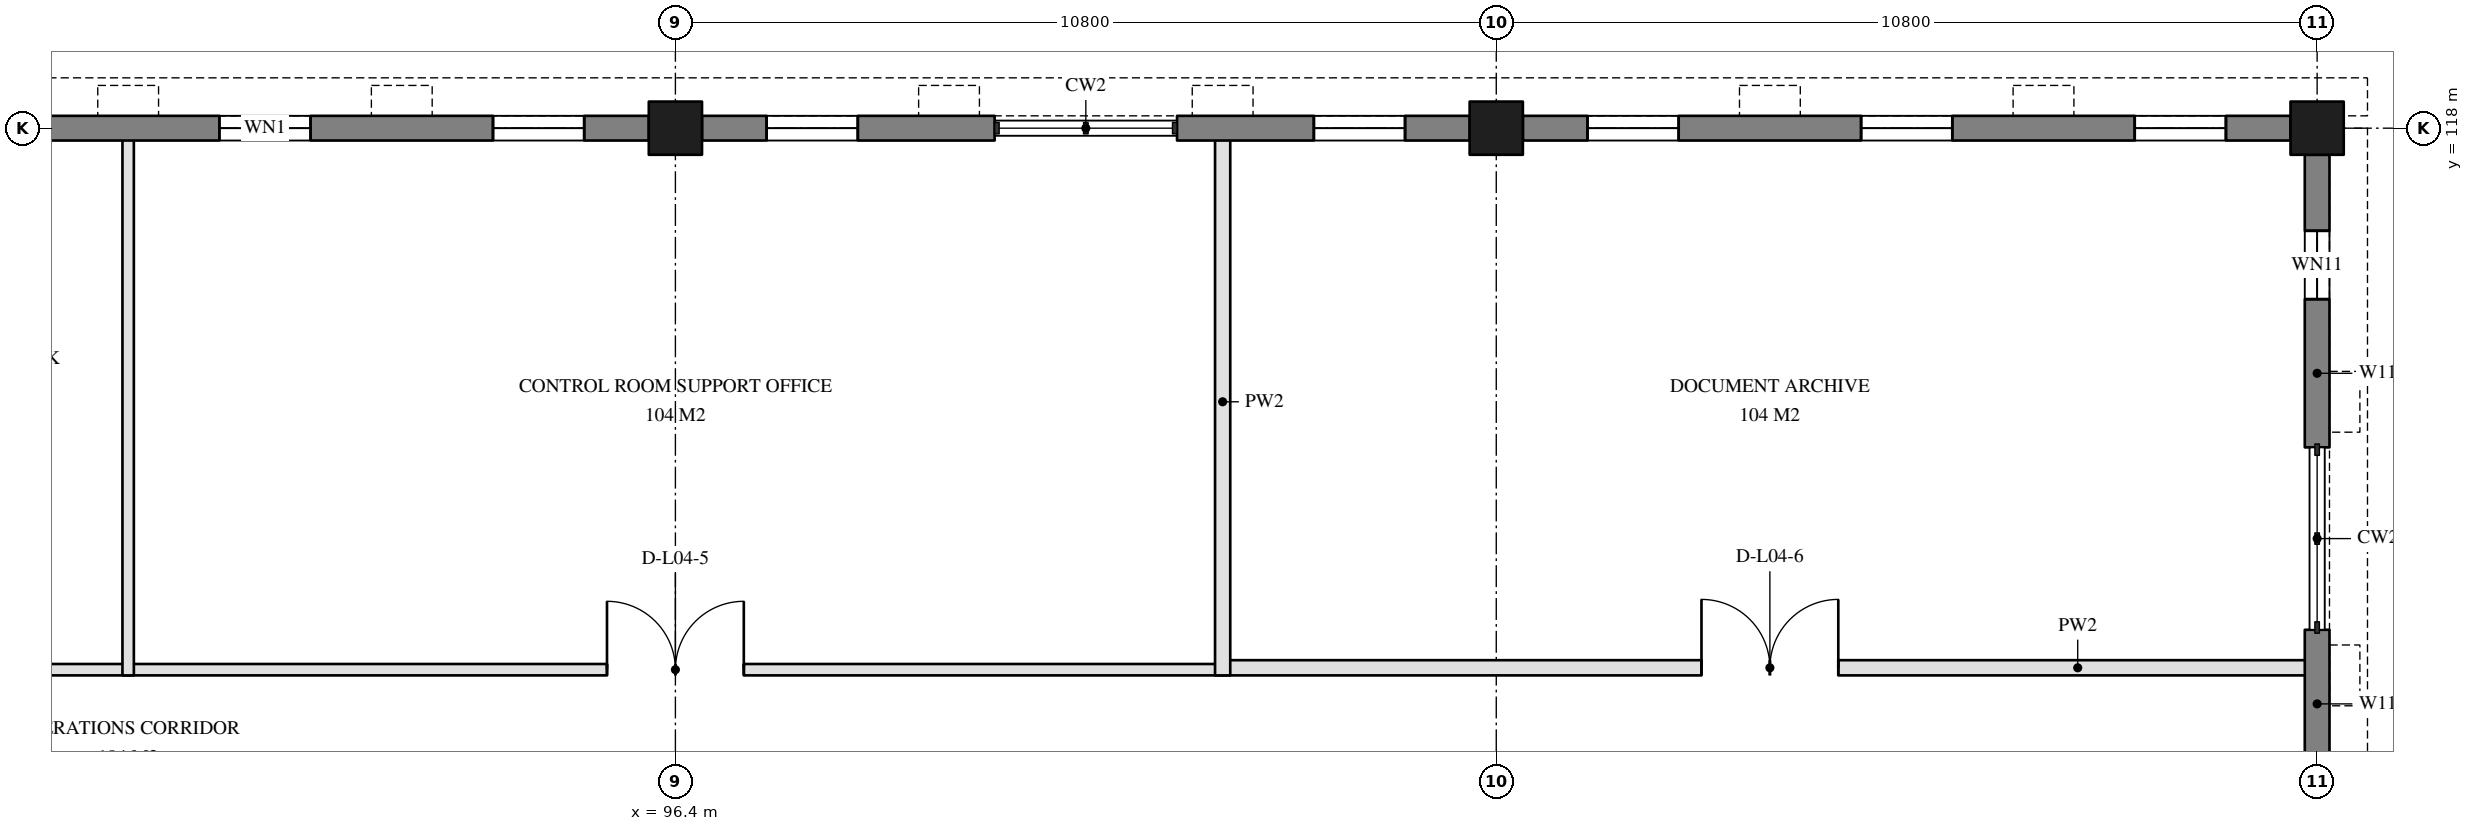
"""IFC4 building model, lengths in metres.
Left out: names, types, materials, properties, quantities, classifications, styles, units other than length and angle.
Written with IfcOpenShell. Run it as: python <this file> out.ifc"""

import sys

from ifc_helpers import new_model, si_unit, direction, frame, frame_2d, origin, origin_2d, place, context, subcontext, project, spatial, rectangle, extrude, element, fill, save


model = new_model("IFC4")
c1 = context("Model", 3, precision=1e-05, world=origin(), true_north=direction((0.0, 1.0)))
c2 = subcontext(c1, "Body", "Model", "MODEL_VIEW")
j1 = project(units=[si_unit("LENGTHUNIT", "METRE"), si_unit("PLANEANGLEUNIT", "RADIAN")], contexts=[c1])
p1 = place(None, origin())
s1 = spatial("IfcSite", under=j1, at=p1, CompositionType="ELEMENT")
p2 = place(p1, origin())
s2 = spatial("IfcBuilding", under=s1, at=p2, CompositionType="ELEMENT")
p3 = place(p2, frame((0.0, 0.0, 16.5)))
s3 = spatial("IfcBuildingStorey", under=s2, at=p3, CompositionType="ELEMENT", Elevation=16.5)
for number, where, z_axis, x_axis in (
    (1, (96.4, 118.0, 0.0), (0.0, 0.0, 1.0), (1.0, 0.0, 0.0)),
    (2, (107.2, 118.0, 0.0), (0.0, 0.0, 1.0), (1.0, 0.0, 0.0)),
    (3, (118.0, 118.0, 0.0), (0.0, 0.0, 1.0), (1.0, 0.0, 0.0)),
):
    element("IfcColumn", number, at=place(p3, frame(where, z_axis=z_axis, x_axis=x_axis)), inside=s3, PredefinedType="COLUMN", context=c2, shape_type="SweptSolid", body=[
        extrude(rectangle(XDim=0.7, YDim=0.7, at=origin_2d()), origin(), (0.0, 0.0, 1.0), 3.9),
    ])
p4 = place(p3, frame((85.95, 118.0, 0.0), z_axis=(0.0, 0.0, 1.0), x_axis=(1.0, 0.0, 0.0)))
e4 = element("IfcWall", 4, at=p4, inside=s3, PredefinedType="SOLIDWALL", context=c2, shape_type="SweptSolid", body=[
    extrude(rectangle(XDim=10.1, YDim=0.325, at=frame_2d((5.05, 0.0))), origin(), (0.0, 0.0, 1.0), 2.8),
])
p5 = place(p4, frame((0.85, 0.0, 0.75)))
e5 = element("IfcOpeningElement", 5, at=p5, cuts=e4, PredefinedType="OPENING", context=c2, shape_type="SweptSolid", body=[
    extrude(rectangle(XDim=1.2, YDim=1.95, at=frame_2d((0.6, 0.975))), frame((0.0, 0.172, 0.0), z_axis=(0.0, -1.0, 0.0), x_axis=(1.0, 0.0, 0.0)), (0.0, 0.0, 1.0), 0.345),
])
p6 = place(p4, frame((4.45, 0.0, 0.75)))
e6 = element("IfcOpeningElement", 6, at=p6, cuts=e4, PredefinedType="OPENING", context=c2, shape_type="SweptSolid", body=[
    extrude(rectangle(XDim=1.2, YDim=1.95, at=frame_2d((0.6, 0.975))), frame((0.0, 0.172, 0.0), z_axis=(0.0, -1.0, 0.0), x_axis=(1.0, 0.0, 0.0)), (0.0, 0.0, 1.0), 0.345),
])
p7 = place(p4, frame((8.05, 0.0, 0.75)))
e7 = element("IfcOpeningElement", 7, at=p7, cuts=e4, PredefinedType="OPENING", context=c2, shape_type="SweptSolid", body=[
    extrude(rectangle(XDim=1.2, YDim=1.95, at=frame_2d((0.6, 0.975))), frame((0.0, 0.172, 0.0), z_axis=(0.0, -1.0, 0.0), x_axis=(1.0, 0.0, 0.0)), (0.0, 0.0, 1.0), 0.345),
])
p8 = place(p3, frame((96.75, 118.0, 0.0), z_axis=(0.0, 0.0, 1.0), x_axis=(1.0, 0.0, 0.0)))
e8 = element("IfcWall", 8, at=p8, inside=s3, PredefinedType="SOLIDWALL", context=c2, shape_type="SweptSolid", body=[
    extrude(rectangle(XDim=3.85, YDim=0.325, at=frame_2d((1.925, 0.0))), origin(), (0.0, 0.0, 1.0), 2.8),
])
p9 = place(p8, frame((0.85, 0.0, 0.75)))
e9 = element("IfcOpeningElement", 9, at=p9, cuts=e8, PredefinedType="OPENING", context=c2, shape_type="SweptSolid", body=[
    extrude(rectangle(XDim=1.2, YDim=1.95, at=frame_2d((0.6, 0.975))), frame((0.0, 0.172, 0.0), z_axis=(0.0, -1.0, 0.0), x_axis=(1.0, 0.0, 0.0)), (0.0, 0.0, 1.0), 0.345),
])
p10 = place(p3, frame((103.0, 118.0, 0.0), z_axis=(0.0, 0.0, 1.0), x_axis=(1.0, 0.0, 0.0)))
e10 = element("IfcWall", 10, at=p10, inside=s3, PredefinedType="SOLIDWALL", context=c2, shape_type="SweptSolid", body=[
    extrude(rectangle(XDim=3.85, YDim=0.325, at=frame_2d((1.925, 0.0))), origin(), (0.0, 0.0, 1.0), 2.8),
])
p11 = place(p10, frame((1.8, 0.0, 0.75)))
e11 = element("IfcOpeningElement", 11, at=p11, cuts=e10, PredefinedType="OPENING", context=c2, shape_type="SweptSolid", body=[
    extrude(rectangle(XDim=1.2, YDim=1.95, at=frame_2d((0.6, 0.975))), frame((0.0, 0.172, 0.0), z_axis=(0.0, -1.0, 0.0), x_axis=(1.0, 0.0, 0.0)), (0.0, 0.0, 1.0), 0.345),
])
p12 = place(p3, frame((107.55, 118.0, 0.0), z_axis=(0.0, 0.0, 1.0), x_axis=(1.0, 0.0, 0.0)))
e12 = element("IfcWall", 12, at=p12, inside=s3, PredefinedType="SOLIDWALL", context=c2, shape_type="SweptSolid", body=[
    extrude(rectangle(XDim=10.1, YDim=0.325, at=frame_2d((5.05, 0.0))), origin(), (0.0, 0.0, 1.0), 2.8),
])
p13 = place(p12, frame((0.85, 0.0, 0.75)))
e13 = element("IfcOpeningElement", 13, at=p13, cuts=e12, PredefinedType="OPENING", context=c2, shape_type="SweptSolid", body=[
    extrude(rectangle(XDim=1.2, YDim=1.95, at=frame_2d((0.6, 0.975))), frame((0.0, 0.172, 0.0), z_axis=(0.0, -1.0, 0.0), x_axis=(1.0, 0.0, 0.0)), (0.0, 0.0, 1.0), 0.345),
])
p14 = place(p12, frame((4.45, 0.0, 0.75)))
e14 = element("IfcOpeningElement", 14, at=p14, cuts=e12, PredefinedType="OPENING", context=c2, shape_type="SweptSolid", body=[
    extrude(rectangle(XDim=1.2, YDim=1.95, at=frame_2d((0.6, 0.975))), frame((0.0, 0.172, 0.0), z_axis=(0.0, -1.0, 0.0), x_axis=(1.0, 0.0, 0.0)), (0.0, 0.0, 1.0), 0.345),
])
p15 = place(p12, frame((8.05, 0.0, 0.75)))
e15 = element("IfcOpeningElement", 15, at=p15, cuts=e12, PredefinedType="OPENING", context=c2, shape_type="SweptSolid", body=[
    extrude(rectangle(XDim=1.2, YDim=1.95, at=frame_2d((0.6, 0.975))), frame((0.0, 0.172, 0.0), z_axis=(0.0, -1.0, 0.0), x_axis=(1.0, 0.0, 0.0)), (0.0, 0.0, 1.0), 0.345),
])
p16 = place(p3, frame((118.0, 107.55, 0.0), z_axis=(0.0, 0.0, 1.0), x_axis=(0.0, 1.0, 0.0)))
e16 = element("IfcWall", 16, at=p16, inside=s3, PredefinedType="SOLIDWALL", context=c2, shape_type="SweptSolid", body=[
    extrude(rectangle(XDim=3.85, YDim=0.325, at=frame_2d((1.925, 0.0))), origin(), (0.0, 0.0, 1.0), 2.8),
])
p17 = place(p16, frame((1.0, 0.0, 0.9)))
e17 = element("IfcOpeningElement", 17, at=p17, cuts=e16, PredefinedType="OPENING", context=c2, shape_type="SweptSolid", body=[
    extrude(rectangle(XDim=0.9, YDim=1.8, at=frame_2d((0.45, 0.9))), frame((0.0, 0.172, 0.0), z_axis=(0.0, -1.0, 0.0), x_axis=(1.0, 0.0, 0.0)), (0.0, 0.0, 1.0), 0.345),
])
p18 = place(p3, frame((118.0, 113.8, 0.0), z_axis=(0.0, 0.0, 1.0), x_axis=(0.0, 1.0, 0.0)))
e18 = element("IfcWall", 18, at=p18, inside=s3, PredefinedType="SOLIDWALL", context=c2, shape_type="SweptSolid", body=[
    extrude(rectangle(XDim=3.85, YDim=0.325, at=frame_2d((1.925, 0.0))), origin(), (0.0, 0.0, 1.0), 2.8),
])
p19 = place(p18, frame((1.95, 0.0, 0.9)))
e19 = element("IfcOpeningElement", 19, at=p19, cuts=e18, PredefinedType="OPENING", context=c2, shape_type="SweptSolid", body=[
    extrude(rectangle(XDim=0.9, YDim=1.8, at=frame_2d((0.45, 0.9))), frame((0.0, 0.172, 0.0), z_axis=(0.0, -1.0, 0.0), x_axis=(1.0, 0.0, 0.0)), (0.0, 0.0, 1.0), 0.345),
])
p20 = place(p3, frame((64.0, 110.875, 0.0), z_axis=(0.0, 0.0, 1.0), x_axis=(1.0, 0.0, 0.0)))
e20 = element("IfcWall", 20, at=p20, inside=s3, PredefinedType="PARTITIONING", context=c2, shape_type="SweptSolid", body=[
    extrude(rectangle(XDim=25.2, YDim=0.15, at=frame_2d((12.6, 0.0))), origin(), (0.0, 0.0, 1.0), 2.8),
])
p21 = place(p20, frame((11.7, 0.0, 0.0)))
e21 = element("IfcOpeningElement", 21, at=p21, cuts=e20, PredefinedType="OPENING", context=c2, shape_type="SweptSolid", body=[
    extrude(rectangle(XDim=1.8, YDim=2.1, at=frame_2d((0.9, 1.05))), frame((0.0, 0.085, 0.0), z_axis=(0.0, -1.0, 0.0), x_axis=(1.0, 0.0, 0.0)), (0.0, 0.0, 1.0), 0.17),
])
p22 = place(p3, frame((89.2, 110.875, 0.0), z_axis=(0.0, 0.0, 1.0), x_axis=(1.0, 0.0, 0.0)))
e22 = element("IfcWall", 22, at=p22, inside=s3, PredefinedType="PARTITIONING", context=c2, shape_type="SweptSolid", body=[
    extrude(rectangle(XDim=14.4, YDim=0.15, at=frame_2d((7.2, 0.0))), origin(), (0.0, 0.0, 1.0), 2.8),
])
p23 = place(p22, frame((6.3, 0.0, 0.0)))
e23 = element("IfcOpeningElement", 23, at=p23, cuts=e22, PredefinedType="OPENING", context=c2, shape_type="SweptSolid", body=[
    extrude(rectangle(XDim=1.8, YDim=2.1, at=frame_2d((0.9, 1.05))), frame((0.0, 0.085, 0.0), z_axis=(0.0, -1.0, 0.0), x_axis=(1.0, 0.0, 0.0)), (0.0, 0.0, 1.0), 0.17),
])
p24 = place(p3, frame((103.6, 110.9, 0.0), z_axis=(0.0, 0.0, 1.0), x_axis=(1.0, 0.0, 0.0)))
e24 = element("IfcWall", 24, at=p24, inside=s3, PredefinedType="PARTITIONING", context=c2, shape_type="SweptSolid", body=[
    extrude(rectangle(XDim=14.4, YDim=0.2, at=frame_2d((7.2, 0.0))), origin(), (0.0, 0.0, 1.0), 2.8),
])
p25 = place(p24, frame((6.3, 0.0, 0.0)))
e25 = element("IfcOpeningElement", 25, at=p25, cuts=e24, PredefinedType="OPENING", context=c2, shape_type="SweptSolid", body=[
    extrude(rectangle(XDim=1.8, YDim=2.1, at=frame_2d((0.9, 1.05))), frame((0.0, 0.11, 0.0), z_axis=(0.0, -1.0, 0.0), x_axis=(1.0, 0.0, 0.0)), (0.0, 0.0, 1.0), 0.22),
])
p26 = place(p3, frame((89.2, 110.8, 0.0), z_axis=(0.0, 0.0, 1.0), x_axis=(0.0, 1.0, 0.0)))
e26 = element("IfcWall", 26, at=p26, inside=s3, PredefinedType="PARTITIONING", context=c2, shape_type="SweptSolid", body=[
    extrude(rectangle(XDim=7.2, YDim=0.15, at=frame_2d((3.6, 0.0))), origin(), (0.0, 0.0, 1.0), 2.8),
])
p27 = place(p3, frame((103.6, 110.8, 0.0), z_axis=(0.0, 0.0, 1.0), x_axis=(0.0, 1.0, 0.0)))
e27 = element("IfcWall", 27, at=p27, inside=s3, PredefinedType="PARTITIONING", context=c2, shape_type="SweptSolid", body=[
    extrude(rectangle(XDim=7.2, YDim=0.2, at=frame_2d((3.6, 0.0))), origin(), (0.0, 0.0, 1.0), 2.8),
])
p28 = place(p6, origin())
e28 = element("IfcWindow", 28, at=p28, inside=s3, PartitioningType="SINGLE_PANEL", PredefinedType="WINDOW", context=c2, shape_type="SweptSolid", body=[
    extrude(rectangle(XDim=1.2, YDim=1.95, at=frame_2d((0.6, 0.975))), frame((0.0, 0.03, 0.0), z_axis=(0.0, -1.0, 0.0), x_axis=(1.0, 0.0, 0.0)), (0.0, 0.0, 1.0), 0.06),
])
fill(e6, e28)
p29 = place(p7, origin())
e29 = element("IfcWindow", 29, at=p29, inside=s3, PartitioningType="SINGLE_PANEL", PredefinedType="WINDOW", context=c2, shape_type="SweptSolid", body=[
    extrude(rectangle(XDim=1.2, YDim=1.95, at=frame_2d((0.6, 0.975))), frame((0.0, 0.03, 0.0), z_axis=(0.0, -1.0, 0.0), x_axis=(1.0, 0.0, 0.0)), (0.0, 0.0, 1.0), 0.06),
])
fill(e7, e29)
p30 = place(p9, origin())
e30 = element("IfcWindow", 30, at=p30, inside=s3, PartitioningType="SINGLE_PANEL", PredefinedType="WINDOW", context=c2, shape_type="SweptSolid", body=[
    extrude(rectangle(XDim=1.2, YDim=1.95, at=frame_2d((0.6, 0.975))), frame((0.0, 0.03, 0.0), z_axis=(0.0, -1.0, 0.0), x_axis=(1.0, 0.0, 0.0)), (0.0, 0.0, 1.0), 0.06),
])
fill(e9, e30)
p31 = place(p11, origin())
e31 = element("IfcWindow", 31, at=p31, inside=s3, PartitioningType="SINGLE_PANEL", PredefinedType="WINDOW", context=c2, shape_type="SweptSolid", body=[
    extrude(rectangle(XDim=1.2, YDim=1.95, at=frame_2d((0.6, 0.975))), frame((0.0, 0.03, 0.0), z_axis=(0.0, -1.0, 0.0), x_axis=(1.0, 0.0, 0.0)), (0.0, 0.0, 1.0), 0.06),
])
fill(e11, e31)
p32 = place(p13, origin())
e32 = element("IfcWindow", 32, at=p32, inside=s3, PartitioningType="SINGLE_PANEL", PredefinedType="WINDOW", context=c2, shape_type="SweptSolid", body=[
    extrude(rectangle(XDim=1.2, YDim=1.95, at=frame_2d((0.6, 0.975))), frame((0.0, 0.03, 0.0), z_axis=(0.0, -1.0, 0.0), x_axis=(1.0, 0.0, 0.0)), (0.0, 0.0, 1.0), 0.06),
])
fill(e13, e32)
p33 = place(p14, origin())
e33 = element("IfcWindow", 33, at=p33, inside=s3, PartitioningType="SINGLE_PANEL", PredefinedType="WINDOW", context=c2, shape_type="SweptSolid", body=[
    extrude(rectangle(XDim=1.2, YDim=1.95, at=frame_2d((0.6, 0.975))), frame((0.0, 0.03, 0.0), z_axis=(0.0, -1.0, 0.0), x_axis=(1.0, 0.0, 0.0)), (0.0, 0.0, 1.0), 0.06),
])
fill(e14, e33)
p34 = place(p15, origin())
e34 = element("IfcWindow", 34, at=p34, inside=s3, PartitioningType="SINGLE_PANEL", PredefinedType="WINDOW", context=c2, shape_type="SweptSolid", body=[
    extrude(rectangle(XDim=1.2, YDim=1.95, at=frame_2d((0.6, 0.975))), frame((0.0, 0.03, 0.0), z_axis=(0.0, -1.0, 0.0), x_axis=(1.0, 0.0, 0.0)), (0.0, 0.0, 1.0), 0.06),
])
fill(e15, e34)
p35 = place(p19, origin())
e35 = element("IfcWindow", 35, at=p35, inside=s3, PartitioningType="SINGLE_PANEL", PredefinedType="WINDOW", context=c2, shape_type="SweptSolid", body=[
    extrude(rectangle(XDim=0.9, YDim=1.8, at=frame_2d((0.45, 0.9))), frame((0.0, 0.03, 0.0), z_axis=(0.0, -1.0, 0.0), x_axis=(1.0, 0.0, 0.0)), (0.0, 0.0, 1.0), 0.06),
])
fill(e19, e35)
p36 = place(p23, origin())
e36 = element("IfcDoor", 36, at=p36, inside=s3, OperationType="DOUBLE_DOOR_DOUBLE_SWING", PredefinedType="DOOR", context=c2, shape_type="SweptSolid", body=[
    extrude(rectangle(XDim=1.8, YDim=2.1, at=frame_2d((0.9, 1.05))), frame((0.0, 0.025, 0.0), z_axis=(0.0, -1.0, 0.0), x_axis=(1.0, 0.0, 0.0)), (0.0, 0.0, 1.0), 0.05),
])
fill(e23, e36)
p37 = place(p25, origin())
e37 = element("IfcDoor", 37, at=p37, inside=s3, OperationType="DOUBLE_DOOR_DOUBLE_SWING", PredefinedType="DOOR", context=c2, shape_type="SweptSolid", body=[
    extrude(rectangle(XDim=1.8, YDim=2.1, at=frame_2d((0.9, 1.05))), frame((0.0, 0.025, 0.0), z_axis=(0.0, -1.0, 0.0), x_axis=(1.0, 0.0, 0.0)), (0.0, 0.0, 1.0), 0.05),
])
fill(e25, e37)
save(model, sys.argv[1])
